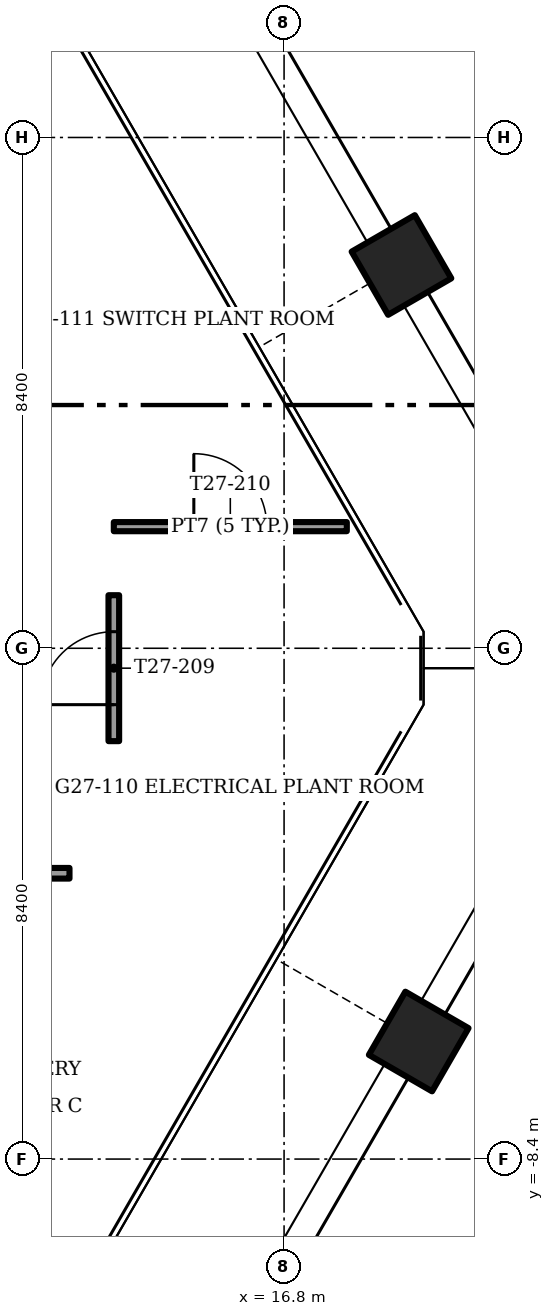
"""IFC4 building model, lengths in metres.
Left out: names, types, materials, properties, quantities, classifications, styles, units other than length and angle.
Written with IfcOpenShell. Run it as: python <this file> out.ifc"""

import sys

from ifc_helpers import new_model, si_unit, direction, frame, frame_2d, origin, origin_2d, place, context, subcontext, project, spatial, rectangle, extrude, element, fill, save


model = new_model("IFC4")
c1 = context("Model", 3, precision=1e-05, world=origin(), true_north=direction((0.0, 1.0)))
c2 = subcontext(c1, "Body", "Model", "MODEL_VIEW")
j1 = project(units=[si_unit("LENGTHUNIT", "METRE"), si_unit("PLANEANGLEUNIT", "RADIAN")], contexts=[c1])
p1 = place(None, origin())
s1 = spatial("IfcSite", under=j1, at=p1, CompositionType="ELEMENT")
p2 = place(p1, origin())
s2 = spatial("IfcBuilding", under=s1, at=p2, CompositionType="ELEMENT")
p3 = place(p2, frame((0.0, 0.0, 108.0)))
s3 = spatial("IfcBuildingStorey", under=s2, at=p3, CompositionType="ELEMENT", Elevation=108.0)
for number, where, z_axis, x_axis in (
    (1, (19.014, -6.467, -1.2), (0.0, 0.0, 1.0), (-0.5, -0.866, 0.0)),
    (2, (18.731, 6.303, -1.2), (0.0, 0.0, 1.0), (0.5, -0.866, 0.0)),
):
    element("IfcColumn", number, at=place(p3, frame(where, z_axis=z_axis, x_axis=x_axis)), inside=s3, PredefinedType="COLUMN", context=c2, shape_type="SweptSolid", body=[
        extrude(rectangle(XDim=1.2, YDim=1.2, at=origin_2d()), origin(), (0.0, 0.0, 1.0), 8.0),
    ])
p4 = place(p3, frame((9.38, -3.7, 0.0), z_axis=(0.0, 0.0, 1.0), x_axis=(1.0, 0.0, 0.0)))
e3 = element("IfcWall", 3, at=p4, inside=s3, PredefinedType="PARTITIONING", context=c2, shape_type="SweptSolid", body=[
    extrude(rectangle(XDim=3.891, YDim=0.175, at=frame_2d((1.946, 0.0))), origin(), (0.0, 0.0, 1.0), 7.7),
])
p5 = place(p4, frame((1.146, 0.0, 0.0)))
e4 = element("IfcOpeningElement", 4, at=p5, cuts=e3, PredefinedType="OPENING", context=c2, shape_type="SweptSolid", body=[
    extrude(rectangle(XDim=1.6, YDim=2.1, at=frame_2d((0.8, 1.05))), frame((0.0, 0.087, 0.0), z_axis=(0.0, -1.0, 0.0), x_axis=(1.0, 0.0, 0.0)), (0.0, 0.0, 1.0), 0.175),
])
p6 = place(p3, frame((14.0, -1.527, 0.0), z_axis=(0.0, 0.0, 1.0), x_axis=(0.0, 1.0, 0.0)))
e5 = element("IfcWall", 5, at=p6, inside=s3, PredefinedType="PARTITIONING", context=c2, shape_type="SweptSolid", body=[
    extrude(rectangle(XDim=2.4, YDim=0.175, at=frame_2d((1.2, 0.0))), origin(), (0.0, 0.0, 1.0), 7.7),
])
p7 = place(p6, frame((0.6, 0.0, 0.0)))
e6 = element("IfcOpeningElement", 6, at=p7, cuts=e5, PredefinedType="OPENING", context=c2, shape_type="SweptSolid", body=[
    extrude(rectangle(XDim=1.2, YDim=2.1, at=frame_2d((0.6, 1.05))), frame((0.0, 0.087, 0.0), z_axis=(0.0, -1.0, 0.0), x_axis=(1.0, 0.0, 0.0)), (0.0, 0.0, 1.0), 0.175),
])
p8 = place(p3, frame((14.0, 2.0, 0.0), z_axis=(0.0, 0.0, 1.0), x_axis=(1.0, 0.0, 0.0)))
e7 = element("IfcWall", 7, at=p8, inside=s3, PredefinedType="PARTITIONING", context=c2, shape_type="SweptSolid", body=[
    extrude(rectangle(XDim=3.832, YDim=0.15, at=frame_2d((1.916, 0.0))), origin(), (0.0, 0.0, 1.0), 7.7),
])
p9 = place(p8, frame((1.316, 0.0, 0.0)))
e8 = element("IfcOpeningElement", 8, at=p9, cuts=e7, PredefinedType="OPENING", context=c2, shape_type="SweptSolid", body=[
    extrude(rectangle(XDim=1.2, YDim=2.1, at=frame_2d((0.6, 1.05))), frame((0.0, 0.075, 0.0), z_axis=(0.0, -1.0, 0.0), x_axis=(1.0, 0.0, 0.0)), (0.0, 0.0, 1.0), 0.15),
])
p10 = place(p7, origin())
e9 = element("IfcDoor", 9, at=p10, inside=s3, OperationType="SINGLE_SWING_LEFT", PredefinedType="DOOR", context=c2, shape_type="SweptSolid", body=[
    extrude(rectangle(XDim=1.2, YDim=2.1, at=frame_2d((0.6, 1.05))), frame((0.0, 0.025, 0.0), z_axis=(0.0, -1.0, 0.0), x_axis=(1.0, 0.0, 0.0)), (0.0, 0.0, 1.0), 0.05),
])
fill(e6, e9)
p11 = place(p9, origin())
e10 = element("IfcDoor", 10, at=p11, inside=s3, OperationType="SINGLE_SWING_RIGHT", PredefinedType="DOOR", context=c2, shape_type="SweptSolid", body=[
    extrude(rectangle(XDim=1.2, YDim=2.1, at=frame_2d((0.6, 1.05))), frame((0.0, 0.025, 0.0), z_axis=(0.0, -1.0, 0.0), x_axis=(1.0, 0.0, 0.0)), (0.0, 0.0, 1.0), 0.05),
])
fill(e8, e10)
save(model, sys.argv[1])
